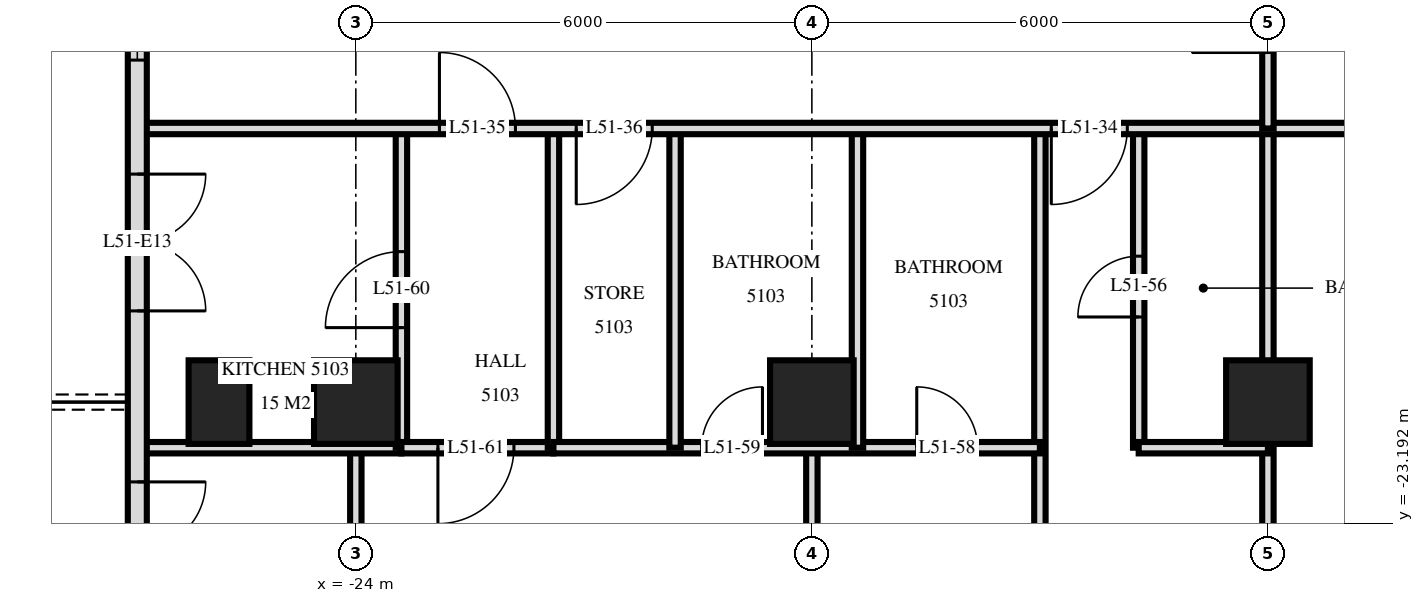
"""IFC4 building model, lengths in metres.
Left out: names, types, materials, properties, quantities, classifications, styles, units other than length and angle.
Written with IfcOpenShell. Run it as: python <this file> out.ifc"""

import sys

from ifc_helpers import new_model, si_unit, direction, frame, frame_2d, origin, origin_2d, place, context, subcontext, project, spatial, rectangle, extrude, element, fill, save


model = new_model("IFC4")
c1 = context("Model", 3, precision=1e-05, world=origin(), true_north=direction((0.0, 1.0)))
c2 = subcontext(c1, "Body", "Model", "MODEL_VIEW")
j1 = project(units=[si_unit("LENGTHUNIT", "METRE"), si_unit("PLANEANGLEUNIT", "RADIAN")], contexts=[c1])
p1 = place(None, origin())
s1 = spatial("IfcSite", under=j1, at=p1, CompositionType="ELEMENT")
p2 = place(p1, origin())
s2 = spatial("IfcBuilding", under=s1, at=p2, CompositionType="ELEMENT")
p3 = place(p2, frame((0.0, 0.0, 197.6)))
s3 = spatial("IfcBuildingStorey", under=s2, at=p3, CompositionType="ELEMENT", Elevation=197.6)
p4 = place(p3, frame((-25.8, -21.6, 0.0), z_axis=(0.0, 0.0, 1.0), x_axis=(0.0, 1.0, 0.0)))
e1 = element("IfcColumn", 1, at=p4, inside=s3, PredefinedType="COLUMN", context=c2, shape_type="SweptSolid", body=[
    extrude(rectangle(XDim=1.1, YDim=0.8, at=origin_2d()), origin(), (0.0, 0.0, 1.0), 3.5),
])
for number, where, z_axis, x_axis in (
    (2, (-24.0, -21.6, 0.0), (0.0, 0.0, 1.0), (1.0, 0.0, 0.0)),
    (3, (-18.0, -21.6, 0.0), (0.0, 0.0, 1.0), (1.0, 0.0, 0.0)),
    (4, (-12.0, -21.6, 0.0), (0.0, 0.0, 1.0), (1.0, 0.0, 0.0)),
):
    element("IfcColumn", number, at=place(p3, frame(where, z_axis=z_axis, x_axis=x_axis)), inside=s3, PredefinedType="COLUMN", context=c2, shape_type="SweptSolid", body=[
        extrude(rectangle(XDim=1.1, YDim=1.1, at=origin_2d()), origin(), (0.0, 0.0, 1.0), 3.5),
    ])
p5 = place(p3, frame((-26.875, -3.325, 0.0), z_axis=(0.0, 0.0, 1.0), x_axis=(0.0, -1.0, 0.0)))
e5 = element("IfcWall", 5, at=p5, inside=s3, PredefinedType="SOLIDWALL", context=c2, shape_type="SweptSolid", body=[
    extrude(rectangle(XDim=21.551, YDim=0.25, at=frame_2d((10.775, 0.0))), origin(), (0.0, 0.0, 1.0), 3.22),
])
p6 = place(p5, frame((7.775, 0.0, 0.0)))
e6 = element("IfcOpeningElement", 6, at=p6, cuts=e5, PredefinedType="OPENING", context=c2, shape_type="SweptSolid", body=[
    extrude(rectangle(XDim=1.8, YDim=2.4, at=frame_2d((0.9, 1.2))), frame((0.0, 0.135, 0.0), z_axis=(0.0, -1.0, 0.0), x_axis=(1.0, 0.0, 0.0)), (0.0, 0.0, 1.0), 0.27),
])
p7 = place(p5, frame((12.575, 0.0, 0.9)))
e7 = element("IfcOpeningElement", 7, at=p7, cuts=e5, PredefinedType="OPENING", context=c2, shape_type="SweptSolid", body=[
    extrude(rectangle(XDim=1.2, YDim=1.5, at=frame_2d((0.6, 0.75))), frame((0.0, 0.135, 0.0), z_axis=(0.0, -1.0, 0.0), x_axis=(1.0, 0.0, 0.0)), (0.0, 0.0, 1.0), 0.27),
])
p8 = place(p5, frame((15.275, 0.0, 0.0)))
e8 = element("IfcOpeningElement", 8, at=p8, cuts=e5, PredefinedType="OPENING", context=c2, shape_type="SweptSolid", body=[
    extrude(rectangle(XDim=1.8, YDim=2.4, at=frame_2d((0.9, 1.2))), frame((0.0, 0.135, 0.0), z_axis=(0.0, -1.0, 0.0), x_axis=(1.0, 0.0, 0.0)), (0.0, 0.0, 1.0), 0.27),
])
p9 = place(p5, frame((19.325, 0.0, 0.0)))
e9 = element("IfcOpeningElement", 9, at=p9, cuts=e5, PredefinedType="OPENING", context=c2, shape_type="SweptSolid", body=[
    extrude(rectangle(XDim=1.8, YDim=2.4, at=frame_2d((0.9, 1.2))), frame((0.0, 0.135, 0.0), z_axis=(0.0, -1.0, 0.0), x_axis=(1.0, 0.0, 0.0)), (0.0, 0.0, 1.0), 0.27),
])
p10 = place(p3, frame((-12.0, -18.0, 0.0), z_axis=(0.0, 0.0, 1.0), x_axis=(0.0, 1.0, 0.0)))
e10 = element("IfcWall", 10, at=p10, inside=s3, PredefinedType="PARTITIONING", context=c2, shape_type="SweptSolid", body=[
    extrude(rectangle(XDim=2.95, YDim=0.15, at=frame_2d((1.475, 0.0))), origin(), (0.0, 0.0, 1.0), 3.22),
])
p11 = place(p10, frame((1.0, 0.0, 0.0)))
e11 = element("IfcOpeningElement", 11, at=p11, cuts=e10, PredefinedType="OPENING", context=c2, shape_type="SweptSolid", body=[
    extrude(rectangle(XDim=1.0, YDim=2.1, at=frame_2d((0.5, 1.05))), frame((0.0, 0.085, 0.0), z_axis=(0.0, -1.0, 0.0), x_axis=(1.0, 0.0, 0.0)), (0.0, 0.0, 1.0), 0.17),
])
p12 = place(p3, frame((-12.0, -29.22, 0.0), z_axis=(0.0, 0.0, 1.0), x_axis=(0.0, 1.0, 0.0)))
e12 = element("IfcWall", 12, at=p12, inside=s3, PredefinedType="PARTITIONING", context=c2, shape_type="SweptSolid", body=[
    extrude(rectangle(XDim=11.22, YDim=0.15, at=frame_2d((5.61, 0.0))), origin(), (0.0, 0.0, 1.0), 3.22),
])
p13 = place(p3, frame((-13.7, -22.2, 0.0), z_axis=(0.0, 0.0, 1.0), x_axis=(0.0, 1.0, 0.0)))
e13 = element("IfcWall", 13, at=p13, inside=s3, PredefinedType="PARTITIONING", context=c2, shape_type="SweptSolid", body=[
    extrude(rectangle(XDim=4.2, YDim=0.15, at=frame_2d((2.1, 0.0))), origin(), (0.0, 0.0, 1.0), 3.22),
])
p14 = place(p13, frame((1.72, 0.0, 0.0)))
e14 = element("IfcOpeningElement", 14, at=p14, cuts=e13, PredefinedType="OPENING", context=c2, shape_type="SweptSolid", body=[
    extrude(rectangle(XDim=0.8, YDim=2.1, at=frame_2d((0.4, 1.05))), frame((0.0, 0.085, 0.0), z_axis=(0.0, -1.0, 0.0), x_axis=(1.0, 0.0, 0.0)), (0.0, 0.0, 1.0), 0.17),
])
p15 = place(p3, frame((-15.0, -29.22, 0.0), z_axis=(0.0, 0.0, 1.0), x_axis=(0.0, 1.0, 0.0)))
e15 = element("IfcWall", 15, at=p15, inside=s3, PredefinedType="PARTITIONING", context=c2, shape_type="SweptSolid", body=[
    extrude(rectangle(XDim=11.22, YDim=0.15, at=frame_2d((5.61, 0.0))), origin(), (0.0, 0.0, 1.0), 3.22),
])
p16 = place(p3, frame((-17.4, -22.2, 0.0), z_axis=(0.0, 0.0, 1.0), x_axis=(0.0, 1.0, 0.0)))
e16 = element("IfcWall", 16, at=p16, inside=s3, PredefinedType="PARTITIONING", context=c2, shape_type="SweptSolid", body=[
    extrude(rectangle(XDim=4.2, YDim=0.15, at=frame_2d((2.1, 0.0))), origin(), (0.0, 0.0, 1.0), 3.22),
])
p17 = place(p3, frame((-18.0, -29.22, 0.0), z_axis=(0.0, 0.0, 1.0), x_axis=(0.0, 1.0, 0.0)))
e17 = element("IfcWall", 17, at=p17, inside=s3, PredefinedType="PARTITIONING", context=c2, shape_type="SweptSolid", body=[
    extrude(rectangle(XDim=7.02, YDim=0.15, at=frame_2d((3.51, 0.0))), origin(), (0.0, 0.0, 1.0), 3.22),
])
p18 = place(p17, frame((2.95, 0.0, 0.0)))
e18 = element("IfcOpeningElement", 18, at=p18, cuts=e17, PredefinedType="OPENING", context=c2, shape_type="SweptSolid", body=[
    extrude(rectangle(XDim=0.9, YDim=2.1, at=frame_2d((0.45, 1.05))), frame((0.0, 0.085, 0.0), z_axis=(0.0, -1.0, 0.0), x_axis=(1.0, 0.0, 0.0)), (0.0, 0.0, 1.0), 0.17),
])
for number, where, z_axis, x_axis in (
    (19, (-19.8, -22.2, 0.0), (0.0, 0.0, 1.0), (0.0, 1.0, 0.0)),
    (20, (-21.4, -22.2, 0.0), (0.0, 0.0, 1.0), (0.0, 1.0, 0.0)),
):
    element("IfcWall", number, at=place(p3, frame(where, z_axis=z_axis, x_axis=x_axis)), inside=s3, PredefinedType="PARTITIONING", context=c2, shape_type="SweptSolid", body=[
        extrude(rectangle(XDim=4.2, YDim=0.15, at=frame_2d((2.1, 0.0))), origin(), (0.0, 0.0, 1.0), 3.22),
    ])
p19 = place(p3, frame((-23.4, -22.2, 0.0), z_axis=(0.0, 0.0, 1.0), x_axis=(0.0, 1.0, 0.0)))
e21 = element("IfcWall", 21, at=p19, inside=s3, PredefinedType="PARTITIONING", context=c2, shape_type="SweptSolid", body=[
    extrude(rectangle(XDim=4.2, YDim=0.15, at=frame_2d((2.1, 0.0))), origin(), (0.0, 0.0, 1.0), 3.22),
])
p20 = place(p19, frame((1.58, 0.0, 0.0)))
e22 = element("IfcOpeningElement", 22, at=p20, cuts=e21, PredefinedType="OPENING", context=c2, shape_type="SweptSolid", body=[
    extrude(rectangle(XDim=1.0, YDim=2.1, at=frame_2d((0.5, 1.05))), frame((0.0, 0.085, 0.0), z_axis=(0.0, -1.0, 0.0), x_axis=(1.0, 0.0, 0.0)), (0.0, 0.0, 1.0), 0.17),
])
p21 = place(p3, frame((-24.0, -28.918, 0.0), z_axis=(0.0, 0.0, 1.0), x_axis=(0.0, 1.0, 0.0)))
e23 = element("IfcWall", 23, at=p21, inside=s3, PredefinedType="PARTITIONING", context=c2, shape_type="SweptSolid", body=[
    extrude(rectangle(XDim=6.718, YDim=0.15, at=frame_2d((3.359, 0.0))), origin(), (0.0, 0.0, 1.0), 3.22),
])
p22 = place(p21, frame((2.936, 0.0, 0.0)))
e24 = element("IfcOpeningElement", 24, at=p22, cuts=e23, PredefinedType="OPENING", context=c2, shape_type="SweptSolid", body=[
    extrude(rectangle(XDim=0.9, YDim=2.1, at=frame_2d((0.45, 1.05))), frame((0.0, 0.085, 0.0), z_axis=(0.0, -1.0, 0.0), x_axis=(1.0, 0.0, 0.0)), (0.0, 0.0, 1.0), 0.17),
])
p23 = place(p3, frame((-23.4, -22.2, 0.0), z_axis=(0.0, 0.0, 1.0), x_axis=(1.0, 0.0, 0.0)))
e25 = element("IfcWall", 25, at=p23, inside=s3, PredefinedType="PARTITIONING", context=c2, shape_type="SweptSolid", body=[
    extrude(rectangle(XDim=2.0, YDim=0.15, at=frame_2d((1.0, 0.0))), origin(), (0.0, 0.0, 1.0), 3.22),
])
p24 = place(p23, frame((0.48, 0.0, 0.0)))
e26 = element("IfcOpeningElement", 26, at=p24, cuts=e25, PredefinedType="OPENING", context=c2, shape_type="SweptSolid", body=[
    extrude(rectangle(XDim=1.0, YDim=2.1, at=frame_2d((0.5, 1.05))), frame((0.0, 0.085, 0.0), z_axis=(0.0, -1.0, 0.0), x_axis=(1.0, 0.0, 0.0)), (0.0, 0.0, 1.0), 0.17),
])
p25 = place(p3, frame((-26.82, -22.2, 0.0), z_axis=(0.0, 0.0, 1.0), x_axis=(1.0, 0.0, 0.0)))
e27 = element("IfcWall", 27, at=p25, inside=s3, PredefinedType="PARTITIONING", context=c2, shape_type="SweptSolid", body=[
    extrude(rectangle(XDim=3.42, YDim=0.15, at=frame_2d((1.71, 0.0))), origin(), (0.0, 0.0, 1.0), 3.22),
])
p26 = place(p3, frame((-21.4, -22.2, 0.0), z_axis=(0.0, 0.0, 1.0), x_axis=(1.0, 0.0, 0.0)))
e28 = element("IfcWall", 28, at=p26, inside=s3, PredefinedType="PARTITIONING", context=c2, shape_type="SweptSolid", body=[
    extrude(rectangle(XDim=6.4, YDim=0.15, at=frame_2d((3.2, 0.0))), origin(), (0.0, 0.0, 1.0), 3.22),
])
p27 = place(p26, frame((4.78, 0.0, 0.0)))
e29 = element("IfcOpeningElement", 29, at=p27, cuts=e28, PredefinedType="OPENING", context=c2, shape_type="SweptSolid", body=[
    extrude(rectangle(XDim=0.8, YDim=2.1, at=frame_2d((0.4, 1.05))), frame((0.0, 0.085, 0.0), z_axis=(0.0, -1.0, 0.0), x_axis=(1.0, 0.0, 0.0)), (0.0, 0.0, 1.0), 0.17),
])
p28 = place(p26, frame((1.95, 0.0, 0.0)))
e30 = element("IfcOpeningElement", 30, at=p28, cuts=e28, PredefinedType="OPENING", context=c2, shape_type="SweptSolid", body=[
    extrude(rectangle(XDim=0.8, YDim=2.1, at=frame_2d((0.4, 1.05))), frame((0.0, 0.085, 0.0), z_axis=(0.0, -1.0, 0.0), x_axis=(1.0, 0.0, 0.0)), (0.0, 0.0, 1.0), 0.17),
])
p29 = place(p3, frame((-13.7, -22.2, 0.0), z_axis=(0.0, 0.0, 1.0), x_axis=(1.0, 0.0, 0.0)))
e31 = element("IfcWall", 31, at=p29, inside=s3, PredefinedType="PARTITIONING", context=c2, shape_type="SweptSolid", body=[
    extrude(rectangle(XDim=1.7, YDim=0.15, at=frame_2d((0.85, 0.0))), origin(), (0.0, 0.0, 1.0), 3.22),
])
p30 = place(p3, frame((-26.82, -18.0, 0.0), z_axis=(0.0, 0.0, 1.0), x_axis=(1.0, 0.0, 0.0)))
e32 = element("IfcWall", 32, at=p30, inside=s3, PredefinedType="PARTITIONING", context=c2, shape_type="SweptSolid", body=[
    extrude(rectangle(XDim=53.64, YDim=0.15, at=frame_2d((26.82, 0.0))), origin(), (0.0, 0.0, 1.0), 3.22),
])
p31 = place(p30, frame((11.97, 0.0, 0.0)))
e33 = element("IfcOpeningElement", 33, at=p31, cuts=e32, PredefinedType="OPENING", context=c2, shape_type="SweptSolid", body=[
    extrude(rectangle(XDim=1.0, YDim=2.1, at=frame_2d((0.5, 1.05))), frame((0.0, 0.085, 0.0), z_axis=(0.0, -1.0, 0.0), x_axis=(1.0, 0.0, 0.0)), (0.0, 0.0, 1.0), 0.17),
])
p32 = place(p30, frame((3.92, 0.0, 0.0)))
e34 = element("IfcOpeningElement", 34, at=p32, cuts=e32, PredefinedType="OPENING", context=c2, shape_type="SweptSolid", body=[
    extrude(rectangle(XDim=1.0, YDim=2.1, at=frame_2d((0.5, 1.05))), frame((0.0, 0.085, 0.0), z_axis=(0.0, -1.0, 0.0), x_axis=(1.0, 0.0, 0.0)), (0.0, 0.0, 1.0), 0.17),
])
p33 = place(p30, frame((5.72, 0.0, 0.0)))
e35 = element("IfcOpeningElement", 35, at=p33, cuts=e32, PredefinedType="OPENING", context=c2, shape_type="SweptSolid", body=[
    extrude(rectangle(XDim=1.0, YDim=2.1, at=frame_2d((0.5, 1.05))), frame((0.0, 0.085, 0.0), z_axis=(0.0, -1.0, 0.0), x_axis=(1.0, 0.0, 0.0)), (0.0, 0.0, 1.0), 0.17),
])
p34 = place(p30, frame((40.67, 0.0, 0.0)))
e36 = element("IfcOpeningElement", 36, at=p34, cuts=e32, PredefinedType="OPENING", context=c2, shape_type="SweptSolid", body=[
    extrude(rectangle(XDim=1.0, YDim=2.1, at=frame_2d((0.5, 1.05))), frame((0.0, 0.085, 0.0), z_axis=(0.0, -1.0, 0.0), x_axis=(1.0, 0.0, 0.0)), (0.0, 0.0, 1.0), 0.17),
])
p35 = place(p30, frame((48.72, 0.0, 0.0)))
e37 = element("IfcOpeningElement", 37, at=p35, cuts=e32, PredefinedType="OPENING", context=c2, shape_type="SweptSolid", body=[
    extrude(rectangle(XDim=1.0, YDim=2.1, at=frame_2d((0.5, 1.05))), frame((0.0, 0.085, 0.0), z_axis=(0.0, -1.0, 0.0), x_axis=(1.0, 0.0, 0.0)), (0.0, 0.0, 1.0), 0.17),
])
p36 = place(p30, frame((46.92, 0.0, 0.0)))
e38 = element("IfcOpeningElement", 38, at=p36, cuts=e32, PredefinedType="OPENING", context=c2, shape_type="SweptSolid", body=[
    extrude(rectangle(XDim=1.0, YDim=2.1, at=frame_2d((0.5, 1.05))), frame((0.0, 0.085, 0.0), z_axis=(0.0, -1.0, 0.0), x_axis=(1.0, 0.0, 0.0)), (0.0, 0.0, 1.0), 0.17),
])
p37 = place(p30, frame((17.32, 0.0, 0.0)))
e39 = element("IfcOpeningElement", 39, at=p37, cuts=e32, PredefinedType="OPENING", context=c2, shape_type="SweptSolid", body=[
    extrude(rectangle(XDim=1.0, YDim=2.1, at=frame_2d((0.5, 1.05))), frame((0.0, 0.085, 0.0), z_axis=(0.0, -1.0, 0.0), x_axis=(1.0, 0.0, 0.0)), (0.0, 0.0, 1.0), 0.17),
])
p38 = place(p30, frame((23.32, 0.0, 0.0)))
e40 = element("IfcOpeningElement", 40, at=p38, cuts=e32, PredefinedType="OPENING", context=c2, shape_type="SweptSolid", body=[
    extrude(rectangle(XDim=1.0, YDim=2.1, at=frame_2d((0.5, 1.05))), frame((0.0, 0.085, 0.0), z_axis=(0.0, -1.0, 0.0), x_axis=(1.0, 0.0, 0.0)), (0.0, 0.0, 1.0), 0.17),
])
p39 = place(p30, frame((29.32, 0.0, 0.0)))
e41 = element("IfcOpeningElement", 41, at=p39, cuts=e32, PredefinedType="OPENING", context=c2, shape_type="SweptSolid", body=[
    extrude(rectangle(XDim=1.0, YDim=2.1, at=frame_2d((0.5, 1.05))), frame((0.0, 0.085, 0.0), z_axis=(0.0, -1.0, 0.0), x_axis=(1.0, 0.0, 0.0)), (0.0, 0.0, 1.0), 0.17),
])
p40 = place(p30, frame((35.32, 0.0, 0.0)))
e42 = element("IfcOpeningElement", 42, at=p40, cuts=e32, PredefinedType="OPENING", context=c2, shape_type="SweptSolid", body=[
    extrude(rectangle(XDim=1.0, YDim=2.1, at=frame_2d((0.5, 1.05))), frame((0.0, 0.085, 0.0), z_axis=(0.0, -1.0, 0.0), x_axis=(1.0, 0.0, 0.0)), (0.0, 0.0, 1.0), 0.17),
])
p41 = place(p7, origin())
e43 = element("IfcWindow", 43, at=p41, inside=s3, PartitioningType="SINGLE_PANEL", PredefinedType="WINDOW", context=c2, shape_type="SweptSolid", body=[
    extrude(rectangle(XDim=1.2, YDim=1.5, at=frame_2d((0.6, 0.75))), frame((0.0, 0.03, 0.0), z_axis=(0.0, -1.0, 0.0), x_axis=(1.0, 0.0, 0.0)), (0.0, 0.0, 1.0), 0.06),
])
fill(e7, e43)
p42 = place(p8, origin())
e44 = element("IfcDoor", 44, at=p42, inside=s3, OperationType="DOUBLE_DOOR_SINGLE_SWING", PredefinedType="DOOR", context=c2, shape_type="SweptSolid", body=[
    extrude(rectangle(XDim=1.8, YDim=2.4, at=frame_2d((0.9, 1.2))), frame((0.0, 0.025, 0.0), z_axis=(0.0, -1.0, 0.0), x_axis=(1.0, 0.0, 0.0)), (0.0, 0.0, 1.0), 0.05),
])
fill(e8, e44)
p43 = place(p9, origin())
e45 = element("IfcDoor", 45, at=p43, inside=s3, OperationType="DOUBLE_DOOR_SINGLE_SWING", PredefinedType="DOOR", context=c2, shape_type="SweptSolid", body=[
    extrude(rectangle(XDim=1.8, YDim=2.4, at=frame_2d((0.9, 1.2))), frame((0.0, 0.025, 0.0), z_axis=(0.0, -1.0, 0.0), x_axis=(1.0, 0.0, 0.0)), (0.0, 0.0, 1.0), 0.05),
])
fill(e9, e45)
p44 = place(p31, frame((0.5, 0.0, 0.0), z_axis=(0.0, 0.0, 1.0), x_axis=(-1.0, 0.0, 0.0)))
e46 = element("IfcDoor", 46, at=p44, inside=s3, OperationType="SINGLE_SWING_LEFT", PredefinedType="DOOR", context=c2, shape_type="SweptSolid", body=[
    extrude(rectangle(XDim=1.0, YDim=2.1, at=frame_2d((0.0, 1.05))), frame((0.0, -0.025, 0.0), z_axis=(0.0, 1.0, 0.0), x_axis=(-1.0, 0.0, 0.0)), (0.0, 0.0, 1.0), 0.05),
])
fill(e33, e46)
p45 = place(p32, origin())
e47 = element("IfcDoor", 47, at=p45, inside=s3, OperationType="SINGLE_SWING_RIGHT", PredefinedType="DOOR", context=c2, shape_type="SweptSolid", body=[
    extrude(rectangle(XDim=1.0, YDim=2.1, at=frame_2d((0.5, 1.05))), frame((0.0, 0.025, 0.0), z_axis=(0.0, -1.0, 0.0), x_axis=(1.0, 0.0, 0.0)), (0.0, 0.0, 1.0), 0.05),
])
fill(e34, e47)
p46 = place(p33, frame((0.5, 0.0, 0.0), z_axis=(0.0, 0.0, 1.0), x_axis=(-1.0, 0.0, 0.0)))
e48 = element("IfcDoor", 48, at=p46, inside=s3, OperationType="SINGLE_SWING_LEFT", PredefinedType="DOOR", context=c2, shape_type="SweptSolid", body=[
    extrude(rectangle(XDim=1.0, YDim=2.1, at=frame_2d((0.0, 1.05))), frame((0.0, -0.025, 0.0), z_axis=(0.0, 1.0, 0.0), x_axis=(-1.0, 0.0, 0.0)), (0.0, 0.0, 1.0), 0.05),
])
fill(e35, e48)
p47 = place(p14, origin())
e49 = element("IfcDoor", 49, at=p47, inside=s3, OperationType="SINGLE_SWING_RIGHT", PredefinedType="DOOR", context=c2, shape_type="SweptSolid", body=[
    extrude(rectangle(XDim=0.8, YDim=2.1, at=frame_2d((0.4, 1.05))), frame((0.0, 0.025, 0.0), z_axis=(0.0, -1.0, 0.0), x_axis=(1.0, 0.0, 0.0)), (0.0, 0.0, 1.0), 0.05),
])
fill(e14, e49)
p48 = place(p27, origin())
e50 = element("IfcDoor", 50, at=p48, inside=s3, OperationType="SINGLE_SWING_RIGHT", PredefinedType="DOOR", context=c2, shape_type="SweptSolid", body=[
    extrude(rectangle(XDim=0.8, YDim=2.1, at=frame_2d((0.4, 1.05))), frame((0.0, 0.025, 0.0), z_axis=(0.0, -1.0, 0.0), x_axis=(1.0, 0.0, 0.0)), (0.0, 0.0, 1.0), 0.05),
])
fill(e29, e50)
p49 = place(p28, origin())
e51 = element("IfcDoor", 51, at=p49, inside=s3, OperationType="SINGLE_SWING_LEFT", PredefinedType="DOOR", context=c2, shape_type="SweptSolid", body=[
    extrude(rectangle(XDim=0.8, YDim=2.1, at=frame_2d((0.4, 1.05))), frame((0.0, 0.025, 0.0), z_axis=(0.0, -1.0, 0.0), x_axis=(1.0, 0.0, 0.0)), (0.0, 0.0, 1.0), 0.05),
])
fill(e30, e51)
p50 = place(p20, origin())
e52 = element("IfcDoor", 52, at=p50, inside=s3, OperationType="SINGLE_SWING_RIGHT", PredefinedType="DOOR", context=c2, shape_type="SweptSolid", body=[
    extrude(rectangle(XDim=1.0, YDim=2.1, at=frame_2d((0.5, 1.05))), frame((0.0, 0.025, 0.0), z_axis=(0.0, -1.0, 0.0), x_axis=(1.0, 0.0, 0.0)), (0.0, 0.0, 1.0), 0.05),
])
fill(e22, e52)
p51 = place(p24, frame((0.5, 0.0, 0.0), z_axis=(0.0, 0.0, 1.0), x_axis=(-1.0, 0.0, 0.0)))
e53 = element("IfcDoor", 53, at=p51, inside=s3, OperationType="SINGLE_SWING_LEFT", PredefinedType="DOOR", context=c2, shape_type="SweptSolid", body=[
    extrude(rectangle(XDim=1.0, YDim=2.1, at=frame_2d((0.0, 1.05))), frame((0.0, -0.025, 0.0), z_axis=(0.0, 1.0, 0.0), x_axis=(-1.0, 0.0, 0.0)), (0.0, 0.0, 1.0), 0.05),
])
fill(e26, e53)
save(model, sys.argv[1])
